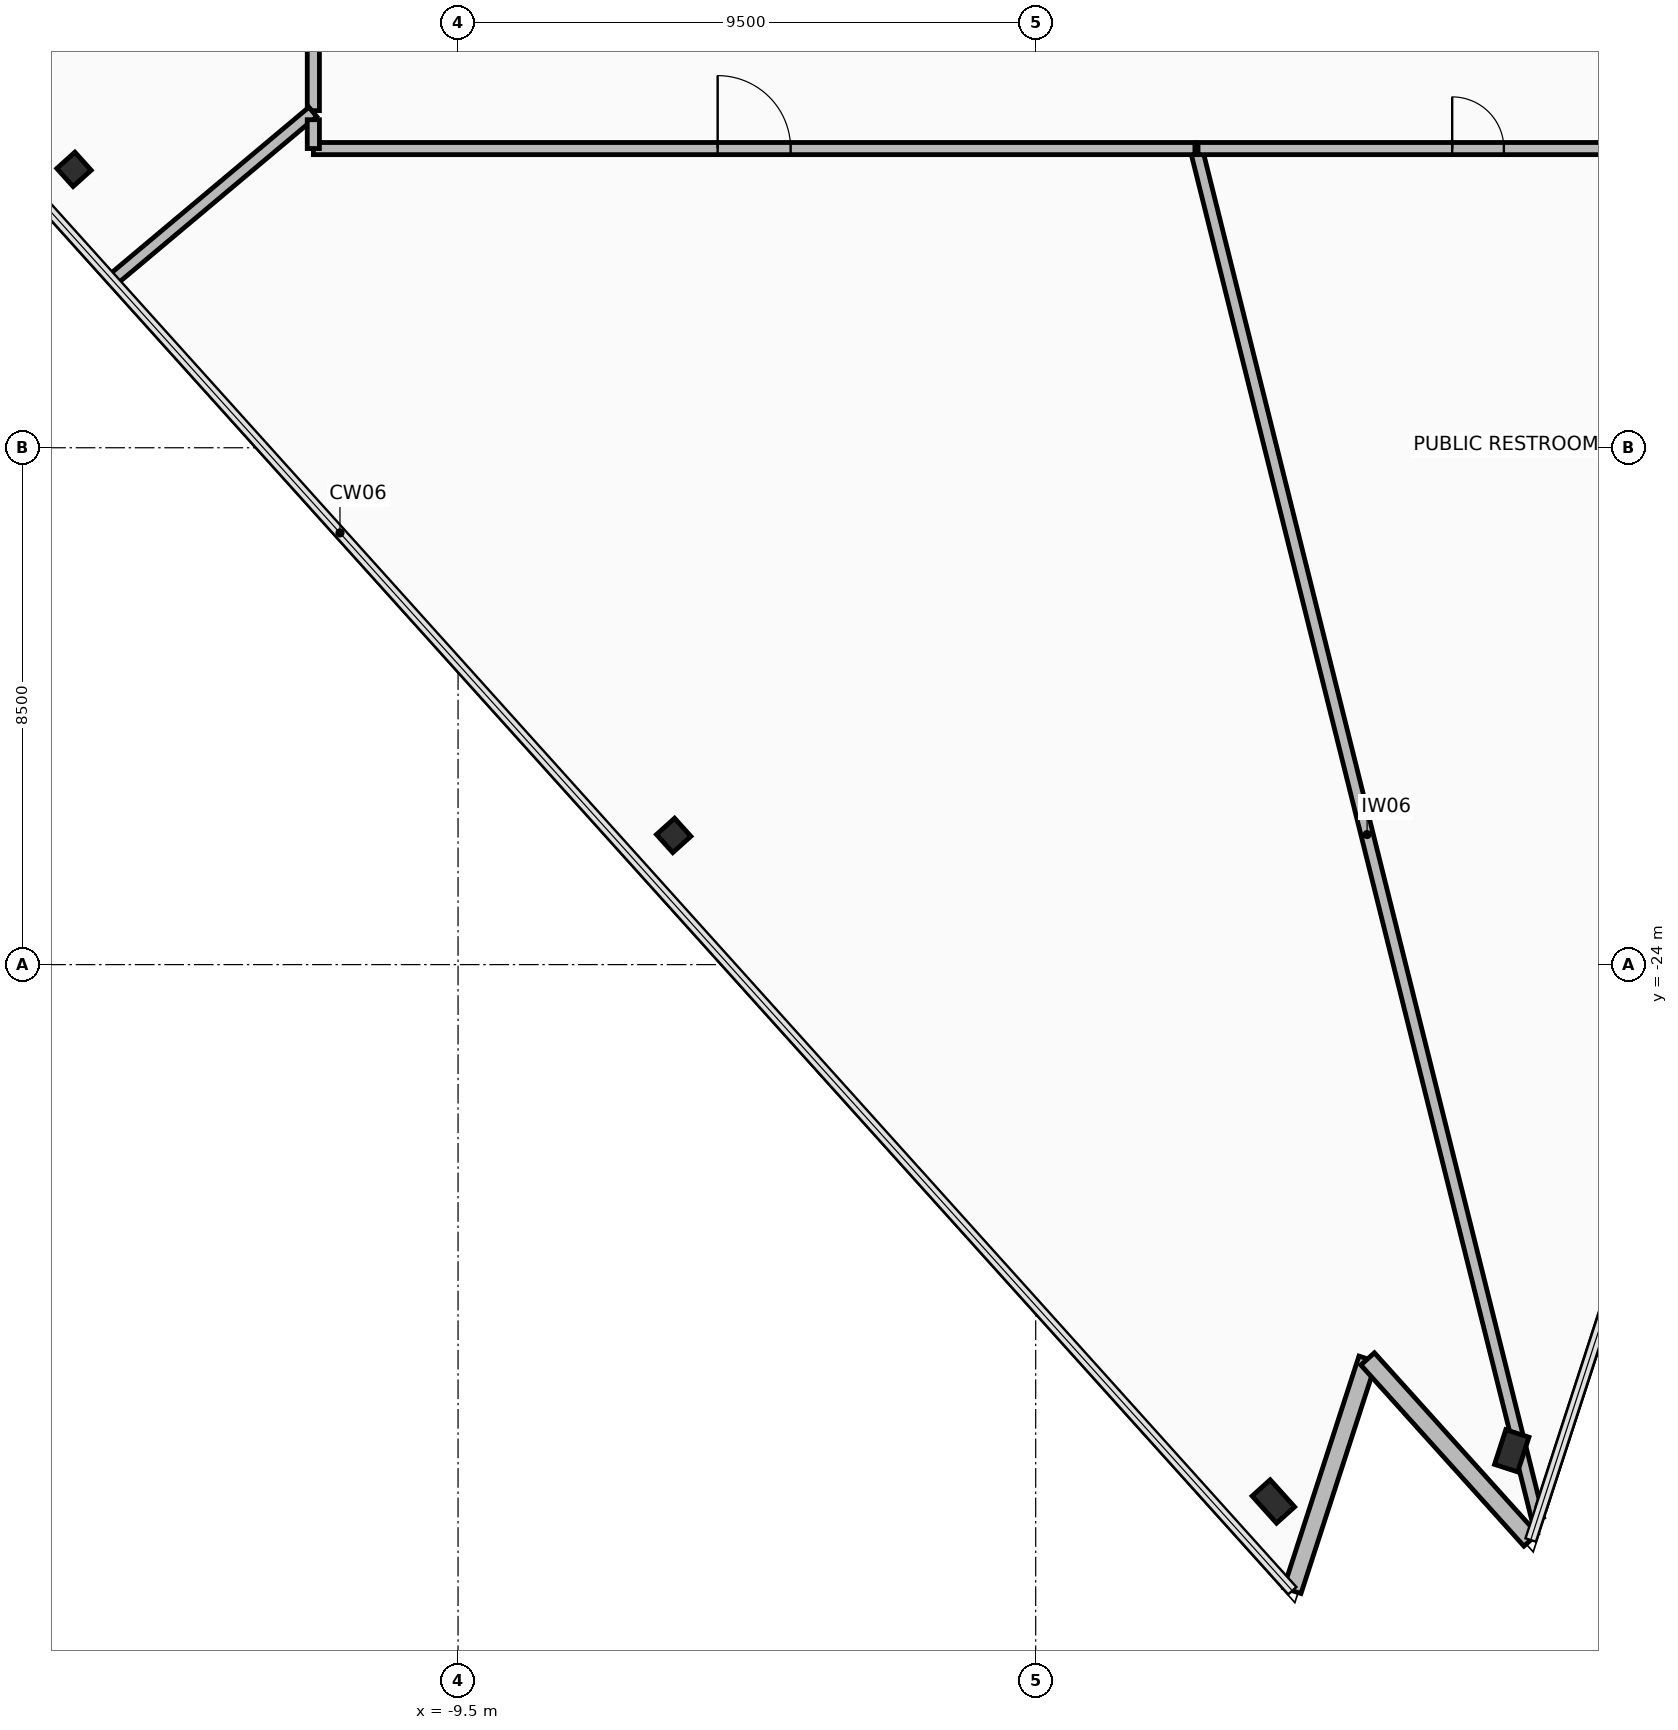
"""IFC4 building model, lengths in metres.
Left out: names, types, materials, properties, quantities, classifications, styles, units other than length and angle.
Written with IfcOpenShell. Run it as: python <this file> out.ifc"""

import sys

from ifc_helpers import new_model, si_unit, direction, frame, frame_2d, origin, origin_2d, place, context, subcontext, project, spatial, rectangle, hollow_rectangle, extrude, element, fill, save


model = new_model("IFC4")
c1 = context("Model", 3, precision=1e-05, world=origin(), true_north=direction((0.0, 1.0)))
c2 = subcontext(c1, "Body", "Model", "MODEL_VIEW")
j1 = project(units=[si_unit("LENGTHUNIT", "METRE"), si_unit("PLANEANGLEUNIT", "RADIAN")], contexts=[c1])
p1 = place(None, origin())
s1 = spatial("IfcSite", under=j1, at=p1, CompositionType="ELEMENT")
p2 = place(p1, origin())
s2 = spatial("IfcBuilding", under=s1, at=p2, CompositionType="ELEMENT")
p3 = place(p2, frame((0.0, 0.0, 290.7)))
s3 = spatial("IfcBuildingStorey", under=s2, at=p3, CompositionType="ELEMENT", Elevation=290.7)
for number, where, z_axis, x_axis in (
    (1, (-15.816, -10.922, 0.0), (0.0, 0.0, 1.0), (-0.669, 0.743, 0.0)),
    (2, (-5.954, -21.875, 0.0), (0.0, 0.0, 1.0), (-0.669, 0.743, 0.0)),
):
    element("IfcColumn", number, at=place(p3, frame(where, z_axis=z_axis, x_axis=x_axis)), inside=s3, PredefinedType="COLUMN", context=c2, shape_type="SweptSolid", body=[
        extrude(hollow_rectangle(XDim=0.4, YDim=0.4, WallThickness=0.025, at=origin_2d()), origin(), (0.0, 0.0, 1.0), 3.65),
    ])
for number, where, z_axis, x_axis in (
    (3, (3.909, -32.829, 0.0), (0.0, 0.0, 1.0), (-0.669, 0.743, 0.0)),
    (4, (7.829, -31.996, 0.0), (0.0, 0.0, 1.0), (0.309, 0.951, 0.0)),
):
    element("IfcColumn", number, at=place(p3, frame(where, z_axis=z_axis, x_axis=x_axis)), inside=s3, PredefinedType="COLUMN", context=c2, shape_type="SweptSolid", body=[
        extrude(hollow_rectangle(XDim=0.4, YDim=0.6, WallThickness=0.03, at=origin_2d()), origin(), (0.0, 0.0, 1.0), 3.65),
    ])
p4 = place(p3, frame((4.221, -34.296, 0.0), z_axis=(0.0, 0.0, 1.0), x_axis=(0.309018580232, 0.951056001018, 0.0)))
e5 = element("IfcWall", 5, at=p4, inside=s3, PredefinedType="STANDARD", context=c2, shape_type="SweptSolid", body=[
    extrude(rectangle(XDim=4.008, YDim=0.3, at=frame_2d((2.004, 0.0))), origin(), (0.0, 0.0, 1.0), 2.81),
])
p5 = place(p3, frame((5.459, -30.484, 0.0), z_axis=(0.0, 0.0, 1.0), x_axis=(0.669132983361, -0.743142685208, 0.0)))
e6 = element("IfcWall", 6, at=p5, inside=s3, PredefinedType="STANDARD", context=c2, shape_type="SweptSolid", body=[
    extrude(rectangle(XDim=4.008, YDim=0.3, at=frame_2d((2.004, 0.0))), origin(), (0.0, 0.0, 1.0), 2.81),
])
p6 = place(p3, frame((8.256, -33.111, 0.0), z_axis=(0.0, 0.0, 1.0), x_axis=(-0.241931126379, 0.970293424738, 0.0)))
e7 = element("IfcWall", 7, at=p6, inside=s3, PredefinedType="PARTITIONING", context=c2, shape_type="SweptSolid", body=[
    extrude(rectangle(XDim=23.189, YDim=0.2, at=frame_2d((11.594, 0.0))), origin(), (0.0, 0.0, 1.0), 2.81),
])
p7 = place(p3, frame((2.67, -10.58, 0.0), z_axis=(0.0, 0.0, 1.0), x_axis=(1.0, 0.0, 0.0)))
e8 = element("IfcWall", 8, at=p7, inside=s3, PredefinedType="PARTITIONING", context=c2, shape_type="SweptSolid", body=[
    extrude(rectangle(XDim=9.209, YDim=0.2, at=frame_2d((4.605, 0.0))), origin(), (0.0, 0.0, 1.0), 2.96),
])
p8 = place(p7, frame((4.18, 0.0, 0.0)))
e9 = element("IfcOpeningElement", 9, at=p8, cuts=e8, PredefinedType="OPENING", context=c2, shape_type="SweptSolid", body=[
    extrude(rectangle(XDim=0.85, YDim=2.1, at=frame_2d((0.425, 1.05))), frame((0.0, 0.11, 0.0), z_axis=(0.0, -1.0, 0.0), x_axis=(1.0, 0.0, 0.0)), (0.0, 0.0, 1.0), 0.22),
])
p9 = place(p3, frame((17.777, -3.807, 0.0), z_axis=(0.0, 0.0, 1.0), x_axis=(-0.309024581215, -0.951054051148, 0.0)))
e10 = element("IfcWall", 10, at=p9, inside=s3, PredefinedType="PARTITIONING", context=c2, shape_type="SweptSolid", body=[
    extrude(rectangle(XDim=30.614, YDim=0.15, at=frame_2d((15.307, 0.0))), origin(), (0.0, 0.0, 1.0), 3.465),
])
p10 = place(p3, frame((-11.88, -1.925, 0.0), z_axis=(0.0, 0.0, 1.0), x_axis=(0.0, -1.0, 0.0)))
e11 = element("IfcWall", 11, at=p10, inside=s3, PredefinedType="PARTITIONING", context=c2, shape_type="SweptSolid", body=[
    extrude(rectangle(XDim=8.032, YDim=0.2, at=frame_2d((4.016, 0.0))), origin(), (0.0, 0.0, 1.0), 2.96),
])
p11 = place(p3, frame((-11.889, -9.976, 0.0), z_axis=(0.0, 0.0, 1.0), x_axis=(-0.766051997516, -0.642778606599, 0.0)))
e12 = element("IfcWall", 12, at=p11, inside=s3, PredefinedType="PARTITIONING", context=c2, shape_type="SweptSolid", body=[
    extrude(rectangle(XDim=4.28, YDim=0.2, at=frame_2d((2.14, 0.0))), origin(), (0.0, 0.0, 1.0), 2.81),
])
p12 = place(p3, frame((-11.879, -10.58, 0.0), z_axis=(0.0, 0.0, 1.0), x_axis=(1.0, 0.0, 0.0)))
e13 = element("IfcWall", 13, at=p12, inside=s3, PredefinedType="PARTITIONING", context=c2, shape_type="SweptSolid", body=[
    extrude(rectangle(XDim=14.498, YDim=0.2, at=frame_2d((7.249, 0.0))), origin(), (0.0, 0.0, 1.0), 2.96),
])
p13 = place(p12, frame((6.649, 0.0, 0.0)))
e14 = element("IfcOpeningElement", 14, at=p13, cuts=e13, PredefinedType="OPENING", context=c2, shape_type="SweptSolid", body=[
    extrude(rectangle(XDim=1.2, YDim=2.15, at=frame_2d((0.6, 1.075))), frame((0.0, 0.11, 0.0), z_axis=(0.0, -1.0, 0.0), x_axis=(1.0, 0.0, 0.0)), (0.0, 0.0, 1.0), 0.22),
])
p14 = place(p3, frame((-11.88, -10.106, 0.0), z_axis=(0.0, 0.0, 1.0), x_axis=(0.0, -1.0, 0.0)))
e15 = element("IfcWall", 15, at=p14, inside=s3, PredefinedType="PARTITIONING", context=c2, shape_type="SweptSolid", body=[
    extrude(rectangle(XDim=0.474, YDim=0.2, at=frame_2d((0.237, 0.0))), origin(), (0.0, 0.0, 1.0), 3.22),
])
p15 = place(p8, origin())
e16 = element("IfcDoor", 16, at=p15, inside=s3, OperationType="SINGLE_SWING_RIGHT", PredefinedType="DOOR", context=c2, shape_type="SweptSolid", body=[
    extrude(rectangle(XDim=0.85, YDim=2.1, at=frame_2d((0.425, 1.05))), frame((0.0, 0.025, 0.0), z_axis=(0.0, -1.0, 0.0), x_axis=(1.0, 0.0, 0.0)), (0.0, 0.0, 1.0), 0.05),
])
fill(e9, e16)
p16 = place(p13, origin())
e17 = element("IfcDoor", 17, at=p16, inside=s3, OperationType="SINGLE_SWING_LEFT", PredefinedType="DOOR", context=c2, shape_type="SweptSolid", body=[
    extrude(rectangle(XDim=1.2, YDim=2.15, at=frame_2d((0.6, 1.075))), frame((0.0, 0.025, 0.0), z_axis=(0.0, -1.0, 0.0), x_axis=(1.0, 0.0, 0.0)), (0.0, 0.0, 1.0), 0.05),
])
fill(e14, e17)
save(model, sys.argv[1])
